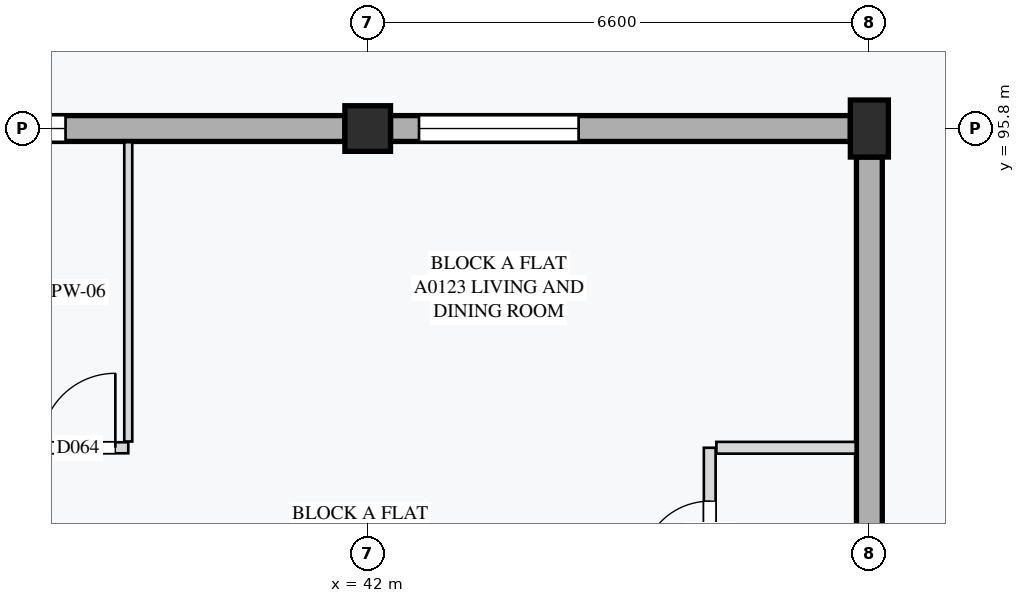
"""IFC4 building model, lengths in metres.
Left out: names, types, materials, properties, quantities, classifications, styles, units other than length and angle.
Written with IfcOpenShell. Run it as: python <this file> out.ifc"""

import sys

from ifc_helpers import new_model, si_unit, direction, frame, frame_2d, origin, origin_2d, place, context, subcontext, project, spatial, rectangle, extrude, element, fill, save


model = new_model("IFC4")
c1 = context("Model", 3, precision=1e-05, world=origin(), true_north=direction((0.0, 1.0)))
c2 = subcontext(c1, "Body", "Model", "MODEL_VIEW")
j1 = project(units=[si_unit("LENGTHUNIT", "METRE"), si_unit("PLANEANGLEUNIT", "RADIAN")], contexts=[c1])
p1 = place(None, origin())
s1 = spatial("IfcSite", under=j1, at=p1, CompositionType="ELEMENT")
p2 = place(p1, origin())
s2 = spatial("IfcBuilding", under=s1, at=p2, CompositionType="ELEMENT")
p3 = place(p2, frame((0.0, 0.0, 4.2)))
s3 = spatial("IfcBuildingStorey", under=s2, at=p3, CompositionType="ELEMENT", Elevation=4.2)
p4 = place(p3, frame((42.0, 95.8, 0.0), z_axis=(0.0, 0.0, 1.0), x_axis=(1.0, 0.0, 0.0)))
e1 = element("IfcColumn", 1, at=p4, inside=s3, PredefinedType="COLUMN", context=c2, shape_type="SweptSolid", body=[
    extrude(rectangle(XDim=0.6, YDim=0.6, at=origin_2d()), origin(), (0.0, 0.0, 1.0), 4.2),
])
p5 = place(p3, frame((48.6, 95.8, 0.0), z_axis=(0.0, 0.0, 1.0), x_axis=(1.0, 0.0, 0.0)))
e2 = element("IfcColumn", 2, at=p5, inside=s3, PredefinedType="COLUMN", context=c2, shape_type="SweptSolid", body=[
    extrude(rectangle(XDim=0.5, YDim=0.75, at=origin_2d()), origin(), (0.0, 0.0, 1.0), 4.2),
])
p6 = place(p3, frame((35.7, 95.8, 0.0), z_axis=(0.0, 0.0, 1.0), x_axis=(1.0, 0.0, 0.0)))
e3 = element("IfcWall", 3, at=p6, inside=s3, PredefinedType="STANDARD", context=c2, shape_type="SweptSolid", body=[
    extrude(rectangle(XDim=6.0, YDim=0.34, at=frame_2d((3.0, 0.0))), origin(), (0.0, 0.0, 1.0), 3.6),
])
p7 = place(p6, frame((0.525, 0.0, 0.85)))
e4 = element("IfcOpeningElement", 4, at=p7, cuts=e3, PredefinedType="OPENING", context=c2, shape_type="SweptSolid", body=[
    extrude(rectangle(XDim=1.8, YDim=1.35, at=frame_2d((0.9, 0.675))), frame((0.0, 0.18, 0.0), z_axis=(0.0, -1.0, 0.0), x_axis=(1.0, 0.0, 0.0)), (0.0, 0.0, 1.0), 0.36),
])
p8 = place(p3, frame((42.3, 95.8, 0.0), z_axis=(0.0, 0.0, 1.0), x_axis=(1.0, 0.0, 0.0)))
e5 = element("IfcWall", 5, at=p8, inside=s3, PredefinedType="STANDARD", context=c2, shape_type="SweptSolid", body=[
    extrude(rectangle(XDim=6.05, YDim=0.34, at=frame_2d((3.025, 0.0))), origin(), (0.0, 0.0, 1.0), 3.6),
])
p9 = place(p8, frame((0.375, 0.0, 0.85)))
e6 = element("IfcOpeningElement", 6, at=p9, cuts=e5, PredefinedType="OPENING", context=c2, shape_type="SweptSolid", body=[
    extrude(rectangle(XDim=2.1, YDim=1.55, at=frame_2d((1.05, 0.775))), frame((0.0, 0.18, 0.0), z_axis=(0.0, -1.0, 0.0), x_axis=(1.0, 0.0, 0.0)), (0.0, 0.0, 1.0), 0.36),
])
p10 = place(p3, frame((48.6, 89.5, 0.0), z_axis=(0.0, 0.0, 1.0), x_axis=(0.0, 1.0, 0.0)))
e7 = element("IfcWall", 7, at=p10, inside=s3, PredefinedType="STANDARD", context=c2, shape_type="SweptSolid", body=[
    extrude(rectangle(XDim=5.925, YDim=0.34, at=frame_2d((2.962, 0.0))), origin(), (0.0, 0.0, 1.0), 3.65),
])
p11 = place(p3, frame((46.5, 89.298, 0.0), z_axis=(0.0, 0.0, 1.0), x_axis=(0.0, 1.0, 0.0)))
e8 = element("IfcWall", 8, at=p11, inside=s3, PredefinedType="PARTITIONING", context=c2, shape_type="SweptSolid", body=[
    extrude(rectangle(XDim=2.302, YDim=0.155, at=frame_2d((1.151, 0.0))), origin(), (0.0, 0.0, 1.0), 3.96),
])
p12 = place(p11, frame((0.7, 0.0, 0.0)))
e9 = element("IfcOpeningElement", 9, at=p12, cuts=e8, PredefinedType="OPENING", context=c2, shape_type="SweptSolid", body=[
    extrude(rectangle(XDim=0.9, YDim=2.16, at=frame_2d((0.45, 1.08))), frame((0.0, 0.087, 0.0), z_axis=(0.0, -1.0, 0.0), x_axis=(1.0, 0.0, 0.0)), (0.0, 0.0, 1.0), 0.175),
])
p13 = place(p3, frame((46.587, 91.6, 0.0), z_axis=(0.0, 0.0, 1.0), x_axis=(1.0, 0.0, 0.0)))
e10 = element("IfcWall", 10, at=p13, inside=s3, PredefinedType="PARTITIONING", context=c2, shape_type="SweptSolid", body=[
    extrude(rectangle(XDim=1.833, YDim=0.155, at=frame_2d((0.916, 0.0))), origin(), (0.0, 0.0, 1.0), 3.96),
])
p14 = place(p3, frame((37.373, 91.6, 0.0), z_axis=(0.0, 0.0, 1.0), x_axis=(1.0, 0.0, 0.0)))
e11 = element("IfcWall", 11, at=p14, inside=s3, PredefinedType="PARTITIONING", context=c2, shape_type="SweptSolid", body=[
    extrude(rectangle(XDim=1.478, YDim=0.145, at=frame_2d((0.739, 0.0))), origin(), (0.0, 0.0, 1.0), 3.96),
])
p15 = place(p14, frame((0.327, 0.0, 0.0)))
e12 = element("IfcOpeningElement", 12, at=p15, cuts=e11, PredefinedType="OPENING", context=c2, shape_type="SweptSolid", body=[
    extrude(rectangle(XDim=0.98, YDim=2.12, at=frame_2d((0.49, 1.06))), frame((0.0, 0.083, 0.0), z_axis=(0.0, -1.0, 0.0), x_axis=(1.0, 0.0, 0.0)), (0.0, 0.0, 1.0), 0.165),
])
p16 = place(p3, frame((38.85, 91.683, 0.0), z_axis=(0.0, 0.0, 1.0), x_axis=(0.0, 1.0, 0.0)))
e13 = element("IfcWall", 13, at=p16, inside=s3, PredefinedType="PARTITIONING", context=c2, shape_type="SweptSolid", body=[
    extrude(rectangle(XDim=3.938, YDim=0.105, at=frame_2d((1.969, 0.0))), origin(), (0.0, 0.0, 1.0), 3.96),
])
p17 = place(p7, origin())
e14 = element("IfcWindow", 14, at=p17, inside=s3, PartitioningType="SINGLE_PANEL", PredefinedType="WINDOW", context=c2, shape_type="SweptSolid", body=[
    extrude(rectangle(XDim=1.8, YDim=1.35, at=frame_2d((0.9, 0.675))), frame((0.0, 0.03, 0.0), z_axis=(0.0, -1.0, 0.0), x_axis=(1.0, 0.0, 0.0)), (0.0, 0.0, 1.0), 0.06),
])
fill(e4, e14)
p18 = place(p9, origin())
e15 = element("IfcWindow", 15, at=p18, inside=s3, PartitioningType="SINGLE_PANEL", PredefinedType="WINDOW", context=c2, shape_type="SweptSolid", body=[
    extrude(rectangle(XDim=2.1, YDim=1.55, at=frame_2d((1.05, 0.775))), frame((0.0, 0.03, 0.0), z_axis=(0.0, -1.0, 0.0), x_axis=(1.0, 0.0, 0.0)), (0.0, 0.0, 1.0), 0.06),
])
fill(e6, e15)
p19 = place(p12, origin())
e16 = element("IfcDoor", 16, at=p19, inside=s3, OperationType="SINGLE_SWING_LEFT", PredefinedType="DOOR", context=c2, shape_type="SweptSolid", body=[
    extrude(rectangle(XDim=0.9, YDim=2.16, at=frame_2d((0.45, 1.08))), frame((0.0, 0.025, 0.0), z_axis=(0.0, -1.0, 0.0), x_axis=(1.0, 0.0, 0.0)), (0.0, 0.0, 1.0), 0.05),
])
fill(e9, e16)
p20 = place(p15, origin())
e17 = element("IfcDoor", 17, at=p20, inside=s3, OperationType="SINGLE_SWING_RIGHT", PredefinedType="DOOR", context=c2, shape_type="SweptSolid", body=[
    extrude(rectangle(XDim=0.98, YDim=2.12, at=frame_2d((0.49, 1.06))), frame((0.0, 0.025, 0.0), z_axis=(0.0, -1.0, 0.0), x_axis=(1.0, 0.0, 0.0)), (0.0, 0.0, 1.0), 0.05),
])
fill(e12, e17)
save(model, sys.argv[1])
